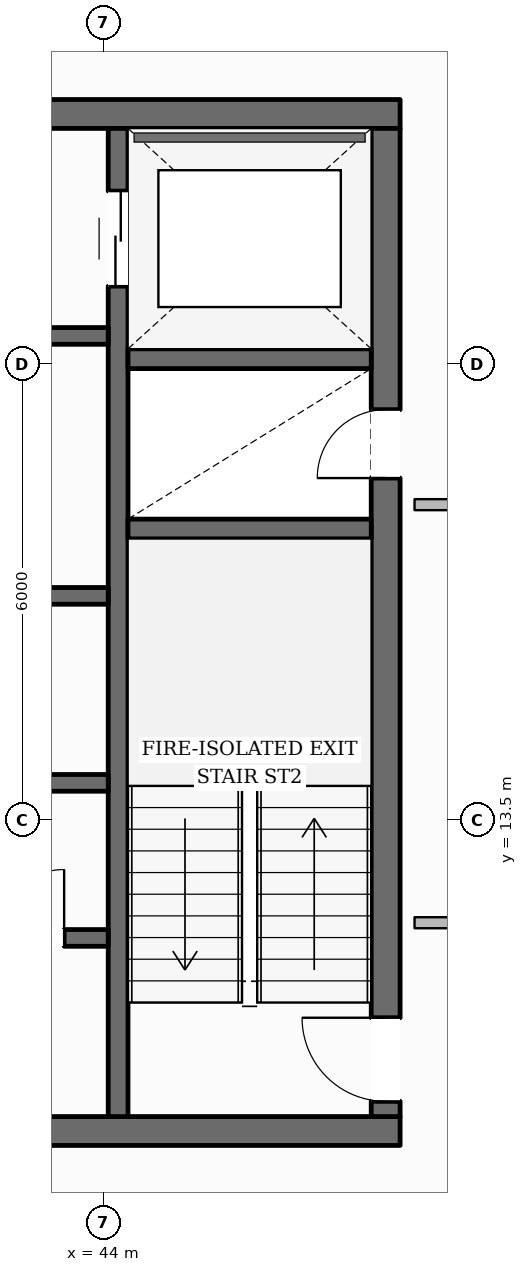
"""IFC4 building model, lengths in metres.
Left out: names, types, materials, properties, quantities, classifications, styles, units other than length and angle.
Written with IfcOpenShell. Run it as: python <this file> out.ifc"""

import sys

from ifc_helpers import new_model, si_unit, direction, frame, frame_2d, origin, place, context, subcontext, project, spatial, rectangle, extrude, element, fill, save


model = new_model("IFC4")
c1 = context("Model", 3, precision=1e-05, world=origin(), true_north=direction((0.0, 1.0)))
c2 = subcontext(c1, "Body", "Model", "MODEL_VIEW")
j1 = project(units=[si_unit("LENGTHUNIT", "METRE"), si_unit("PLANEANGLEUNIT", "RADIAN")], contexts=[c1])
p1 = place(None, origin())
s1 = spatial("IfcSite", under=j1, at=p1, CompositionType="ELEMENT")
p2 = place(p1, origin())
s2 = spatial("IfcBuilding", under=s1, at=p2, CompositionType="ELEMENT")
p3 = place(p2, frame((0.0, 0.0, 239.5)))
s3 = spatial("IfcBuildingStorey", under=s2, at=p3, CompositionType="ELEMENT", Elevation=239.5)
p4 = place(p3, frame((28.1, 9.41, 0.0), z_axis=(0.0, 0.0, 1.0), x_axis=(1.0, 0.0, 0.0)))
e1 = element("IfcWall", 1, at=p4, inside=s3, PredefinedType="SOLIDWALL", context=c2, shape_type="SweptSolid", body=[
    extrude(rectangle(XDim=19.8, YDim=0.38, at=frame_2d((9.9, 0.0))), origin(), (0.0, 0.0, 1.0), 3.61),
])
p5 = place(p4, frame((10.4, 0.0, 0.0)))
e2 = element("IfcOpeningElement", 2, at=p5, cuts=e1, PredefinedType="OPENING", context=c2, shape_type="SweptSolid", body=[
    extrude(rectangle(XDim=1.4, YDim=2.2, at=frame_2d((0.7, 1.1))), frame((0.0, 0.2, 0.0), z_axis=(0.0, -1.0, 0.0), x_axis=(1.0, 0.0, 0.0)), (0.0, 0.0, 1.0), 0.4),
])
p6 = place(p3, frame((28.1, 22.79, 0.0), z_axis=(0.0, 0.0, 1.0), x_axis=(1.0, 0.0, 0.0)))
e3 = element("IfcWall", 3, at=p6, inside=s3, PredefinedType="SOLIDWALL", context=c2, shape_type="SweptSolid", body=[
    extrude(rectangle(XDim=19.8, YDim=0.38, at=frame_2d((9.9, 0.0))), origin(), (0.0, 0.0, 1.0), 3.61),
])
p7 = place(p6, frame((6.175, 0.0, 0.0)))
e4 = element("IfcOpeningElement", 4, at=p7, cuts=e3, PredefinedType="OPENING", context=c2, shape_type="SweptSolid", body=[
    extrude(rectangle(XDim=1.05, YDim=2.15, at=frame_2d((0.525, 1.075))), frame((0.0, 0.2, 0.0), z_axis=(0.0, -1.0, 0.0), x_axis=(1.0, 0.0, 0.0)), (0.0, 0.0, 1.0), 0.4),
])
p8 = place(p6, frame((12.575, 0.0, 0.0)))
e5 = element("IfcOpeningElement", 5, at=p8, cuts=e3, PredefinedType="OPENING", context=c2, shape_type="SweptSolid", body=[
    extrude(rectangle(XDim=1.05, YDim=2.15, at=frame_2d((0.525, 1.075))), frame((0.0, 0.2, 0.0), z_axis=(0.0, -1.0, 0.0), x_axis=(1.0, 0.0, 0.0)), (0.0, 0.0, 1.0), 0.4),
])
p9 = place(p3, frame((47.71, 9.6, 0.0), z_axis=(0.0, 0.0, 1.0), x_axis=(0.0, 1.0, 0.0)))
e6 = element("IfcWall", 6, at=p9, inside=s3, PredefinedType="SOLIDWALL", context=c2, shape_type="SweptSolid", body=[
    extrude(rectangle(XDim=13.0, YDim=0.38, at=frame_2d((6.5, 0.0))), origin(), (0.0, 0.0, 1.0), 3.61),
])
p10 = place(p9, frame((0.2, 0.0, 0.0)))
e7 = element("IfcOpeningElement", 7, at=p10, cuts=e6, PredefinedType="OPENING", context=c2, shape_type="SweptSolid", body=[
    extrude(rectangle(XDim=1.1, YDim=2.15, at=frame_2d((0.55, 1.075))), frame((0.0, 0.2, 0.0), z_axis=(0.0, -1.0, 0.0), x_axis=(1.0, 0.0, 0.0)), (0.0, 0.0, 1.0), 0.4),
])
p11 = place(p9, frame((8.4, 0.0, 0.0)))
e8 = element("IfcOpeningElement", 8, at=p11, cuts=e6, PredefinedType="OPENING", context=c2, shape_type="SweptSolid", body=[
    extrude(rectangle(XDim=0.9, YDim=2.1, at=frame_2d((0.45, 1.05))), frame((0.0, 0.2, 0.0), z_axis=(0.0, -1.0, 0.0), x_axis=(1.0, 0.0, 0.0)), (0.0, 0.0, 1.0), 0.4),
])
p12 = place(p3, frame((44.19, 9.6, 0.0), z_axis=(0.0, 0.0, 1.0), x_axis=(0.0, 1.0, 0.0)))
e9 = element("IfcWall", 9, at=p12, inside=s3, PredefinedType="SHEAR", context=c2, shape_type="SweptSolid", body=[
    extrude(rectangle(XDim=13.0, YDim=0.26, at=frame_2d((6.5, 0.0))), origin(), (0.0, 0.0, 1.0), 3.61),
])
p13 = place(p12, frame((10.925, 0.0, 0.0)))
e10 = element("IfcOpeningElement", 10, at=p13, cuts=e9, PredefinedType="OPENING", context=c2, shape_type="SweptSolid", body=[
    extrude(rectangle(XDim=1.25, YDim=2.25, at=frame_2d((0.625, 1.125))), frame((0.0, 0.14, 0.0), z_axis=(0.0, -1.0, 0.0), x_axis=(1.0, 0.0, 0.0)), (0.0, 0.0, 1.0), 0.28),
])
for number, where, z_axis, x_axis in (
    (11, (44.32, 17.33, 0.0), (0.0, 0.0, 1.0), (1.0, 0.0, 0.0)),
    (12, (44.32, 19.57, 0.0), (0.0, 0.0, 1.0), (1.0, 0.0, 0.0)),
):
    element("IfcWall", number, at=place(p3, frame(where, z_axis=z_axis, x_axis=x_axis)), inside=s3, PredefinedType="SHEAR", context=c2, shape_type="SweptSolid", body=[
        extrude(rectangle(XDim=3.2, YDim=0.26, at=frame_2d((1.6, 0.0))), origin(), (0.0, 0.0, 1.0), 3.61),
    ])
p14 = place(p3, frame((31.94, 19.87, 0.0), z_axis=(0.0, 0.0, 1.0), x_axis=(1.0, 0.0, 0.0)))
e13 = element("IfcWall", 13, at=p14, inside=s3, PredefinedType="SOLIDWALL", context=c2, shape_type="SweptSolid", body=[
    extrude(rectangle(XDim=12.12, YDim=0.22, at=frame_2d((6.06, 0.0))), origin(), (0.0, 0.0, 1.0), 3.61),
])
p15 = place(p14, frame((6.3, 0.0, 0.0)))
e14 = element("IfcOpeningElement", 14, at=p15, cuts=e13, PredefinedType="OPENING", context=c2, shape_type="SweptSolid", body=[
    extrude(rectangle(XDim=1.1, YDim=2.15, at=frame_2d((0.55, 1.075))), frame((0.0, 0.12, 0.0), z_axis=(0.0, -1.0, 0.0), x_axis=(1.0, 0.0, 0.0)), (0.0, 0.0, 1.0), 0.24),
])
p16 = place(p14, frame((8.01, 0.0, 0.0)))
e15 = element("IfcOpeningElement", 15, at=p16, cuts=e13, PredefinedType="OPENING", context=c2, shape_type="SweptSolid", body=[
    extrude(rectangle(XDim=0.9, YDim=2.1, at=frame_2d((0.45, 1.05))), frame((0.0, 0.12, 0.0), z_axis=(0.0, -1.0, 0.0), x_axis=(1.0, 0.0, 0.0)), (0.0, 0.0, 1.0), 0.24),
])
p17 = place(p14, frame((10.21, 0.0, 0.0)))
e16 = element("IfcOpeningElement", 16, at=p17, cuts=e13, PredefinedType="OPENING", context=c2, shape_type="SweptSolid", body=[
    extrude(rectangle(XDim=0.9, YDim=2.1, at=frame_2d((0.45, 1.05))), frame((0.0, 0.12, 0.0), z_axis=(0.0, -1.0, 0.0), x_axis=(1.0, 0.0, 0.0)), (0.0, 0.0, 1.0), 0.24),
])
p18 = place(p3, frame((31.94, 16.45, 0.0), z_axis=(0.0, 0.0, 1.0), x_axis=(1.0, 0.0, 0.0)))
e17 = element("IfcWall", 17, at=p18, inside=s3, PredefinedType="SOLIDWALL", context=c2, shape_type="SweptSolid", body=[
    extrude(rectangle(XDim=12.12, YDim=0.22, at=frame_2d((6.06, 0.0))), origin(), (0.0, 0.0, 1.0), 3.61),
])
p19 = place(p3, frame((31.94, 13.99, 0.0), z_axis=(0.0, 0.0, 1.0), x_axis=(1.0, 0.0, 0.0)))
e18 = element("IfcWall", 18, at=p19, inside=s3, PredefinedType="SOLIDWALL", context=c2, shape_type="SweptSolid", body=[
    extrude(rectangle(XDim=12.12, YDim=0.22, at=frame_2d((6.06, 0.0))), origin(), (0.0, 0.0, 1.0), 3.61),
])
p20 = place(p19, frame((1.91, 0.0, 0.0)))
e19 = element("IfcOpeningElement", 19, at=p20, cuts=e18, PredefinedType="OPENING", context=c2, shape_type="SweptSolid", body=[
    extrude(rectangle(XDim=0.9, YDim=2.1, at=frame_2d((0.45, 1.05))), frame((0.0, 0.12, 0.0), z_axis=(0.0, -1.0, 0.0), x_axis=(1.0, 0.0, 0.0)), (0.0, 0.0, 1.0), 0.24),
])
p21 = place(p19, frame((7.95, 0.0, 0.0)))
e20 = element("IfcOpeningElement", 20, at=p21, cuts=e18, PredefinedType="OPENING", context=c2, shape_type="SweptSolid", body=[
    extrude(rectangle(XDim=1.02, YDim=2.15, at=frame_2d((0.51, 1.075))), frame((0.0, 0.12, 0.0), z_axis=(0.0, -1.0, 0.0), x_axis=(1.0, 0.0, 0.0)), (0.0, 0.0, 1.0), 0.24),
])
p22 = place(p3, frame((40.28, 11.95, 0.0), z_axis=(0.0, 0.0, 1.0), x_axis=(1.0, 0.0, 0.0)))
e21 = element("IfcWall", 21, at=p22, inside=s3, PredefinedType="SOLIDWALL", context=c2, shape_type="SweptSolid", body=[
    extrude(rectangle(XDim=3.78, YDim=0.22, at=frame_2d((1.89, 0.0))), origin(), (0.0, 0.0, 1.0), 3.61),
])
p23 = place(p22, frame((0.47, 0.0, 0.0)))
e22 = element("IfcOpeningElement", 22, at=p23, cuts=e21, PredefinedType="OPENING", context=c2, shape_type="SweptSolid", body=[
    extrude(rectangle(XDim=0.9, YDim=2.1, at=frame_2d((0.45, 1.05))), frame((0.0, 0.12, 0.0), z_axis=(0.0, -1.0, 0.0), x_axis=(1.0, 0.0, 0.0)), (0.0, 0.0, 1.0), 0.24),
])
p24 = place(p22, frame((2.3, 0.0, 0.0)))
e23 = element("IfcOpeningElement", 23, at=p24, cuts=e21, PredefinedType="OPENING", context=c2, shape_type="SweptSolid", body=[
    extrude(rectangle(XDim=0.9, YDim=2.1, at=frame_2d((0.45, 1.05))), frame((0.0, 0.12, 0.0), z_axis=(0.0, -1.0, 0.0), x_axis=(1.0, 0.0, 0.0)), (0.0, 0.0, 1.0), 0.24),
])
p25 = place(p3, frame((41.394, 44.187, 0.0), z_axis=(0.0, 0.0, 1.0), x_axis=(0.494287620829, -0.869298422807, 0.0)))
e24 = element("IfcWall", 24, at=p25, inside=s3, PredefinedType="STANDARD", context=c2, shape_type="SweptSolid", body=[
    extrude(rectangle(XDim=37.899, YDim=0.35, at=frame_2d((18.95, 0.0))), origin(), (0.0, 0.0, 1.0), 3.196),
])
p26 = place(p25, frame((33.674, 0.0, 0.65)))
e25 = element("IfcOpeningElement", 25, at=p26, cuts=e24, PredefinedType="OPENING", context=c2, shape_type="SweptSolid", body=[
    extrude(rectangle(XDim=1.35, YDim=1.75, at=frame_2d((0.675, 0.875))), frame((0.0, 0.185, 0.0), z_axis=(0.0, -1.0, 0.0), x_axis=(1.0, 0.0, 0.0)), (0.0, 0.0, 1.0), 0.37),
])
p27 = place(p25, frame((27.515, 0.0, 0.65)))
e26 = element("IfcOpeningElement", 26, at=p27, cuts=e24, PredefinedType="OPENING", context=c2, shape_type="SweptSolid", body=[
    extrude(rectangle(XDim=1.35, YDim=1.75, at=frame_2d((0.675, 0.875))), frame((0.0, 0.185, 0.0), z_axis=(0.0, -1.0, 0.0), x_axis=(1.0, 0.0, 0.0)), (0.0, 0.0, 1.0), 0.37),
])
p28 = place(p25, frame((21.357, 0.0, 0.65)))
e27 = element("IfcOpeningElement", 27, at=p28, cuts=e24, PredefinedType="OPENING", context=c2, shape_type="SweptSolid", body=[
    extrude(rectangle(XDim=1.35, YDim=1.75, at=frame_2d((0.675, 0.875))), frame((0.0, 0.185, 0.0), z_axis=(0.0, -1.0, 0.0), x_axis=(1.0, 0.0, 0.0)), (0.0, 0.0, 1.0), 0.37),
])
p29 = place(p25, frame((9.04, 0.0, 0.65)))
e28 = element("IfcOpeningElement", 28, at=p29, cuts=e24, PredefinedType="OPENING", context=c2, shape_type="SweptSolid", body=[
    extrude(rectangle(XDim=1.35, YDim=1.75, at=frame_2d((0.675, 0.875))), frame((0.0, 0.185, 0.0), z_axis=(0.0, -1.0, 0.0), x_axis=(1.0, 0.0, 0.0)), (0.0, 0.0, 1.0), 0.37),
])
p30 = place(p25, frame((2.882, 0.0, 0.65)))
e29 = element("IfcOpeningElement", 29, at=p30, cuts=e24, PredefinedType="OPENING", context=c2, shape_type="SweptSolid", body=[
    extrude(rectangle(XDim=1.35, YDim=1.75, at=frame_2d((0.675, 0.875))), frame((0.0, 0.185, 0.0), z_axis=(0.0, -1.0, 0.0), x_axis=(1.0, 0.0, 0.0)), (0.0, 0.0, 1.0), 0.37),
])
for number, where, z_axis, x_axis in (
    (30, (49.91, 17.65, 0.0), (0.0, 0.0, 1.0), (-1.0, 0.0, 0.0)),
    (31, (48.09, 12.15, 0.0), (0.0, 0.0, 1.0), (1.0, 0.0, 0.0)),
):
    element("IfcWall", number, at=place(p3, frame(where, z_axis=z_axis, x_axis=x_axis)), inside=s3, PredefinedType="PARTITIONING", context=c2, shape_type="SweptSolid", body=[
        extrude(rectangle(XDim=1.82, YDim=0.145, at=frame_2d((0.91, 0.0))), origin(), (0.0, 0.0, 1.0), 3.61),
    ])
p31 = place(p10, origin())
e32 = element("IfcDoor", 32, at=p31, inside=s3, OperationType="SINGLE_SWING_RIGHT", PredefinedType="DOOR", context=c2, shape_type="SweptSolid", body=[
    extrude(rectangle(XDim=1.1, YDim=2.15, at=frame_2d((0.55, 1.075))), frame((0.0, 0.025, 0.0), z_axis=(0.0, -1.0, 0.0), x_axis=(1.0, 0.0, 0.0)), (0.0, 0.0, 1.0), 0.05),
])
fill(e7, e32)
p32 = place(p11, origin())
e33 = element("IfcDoor", 33, at=p32, inside=s3, OperationType="SINGLE_SWING_LEFT", PredefinedType="DOOR", context=c2, shape_type="SweptSolid", body=[
    extrude(rectangle(XDim=0.9, YDim=2.1, at=frame_2d((0.45, 1.05))), frame((0.0, 0.025, 0.0), z_axis=(0.0, -1.0, 0.0), x_axis=(1.0, 0.0, 0.0)), (0.0, 0.0, 1.0), 0.05),
])
fill(e8, e33)
p33 = place(p13, origin())
e34 = element("IfcDoor", 34, at=p33, inside=s3, OperationType="DOUBLE_DOOR_SLIDING", PredefinedType="DOOR", context=c2, shape_type="SweptSolid", body=[
    extrude(rectangle(XDim=1.25, YDim=2.25, at=frame_2d((0.625, 1.125))), frame((0.0, 0.025, 0.0), z_axis=(0.0, -1.0, 0.0), x_axis=(1.0, 0.0, 0.0)), (0.0, 0.0, 1.0), 0.05),
])
fill(e10, e34)
p34 = place(p24, origin())
e35 = element("IfcDoor", 35, at=p34, inside=s3, OperationType="SINGLE_SWING_RIGHT", PredefinedType="DOOR", context=c2, shape_type="SweptSolid", body=[
    extrude(rectangle(XDim=0.9, YDim=2.1, at=frame_2d((0.45, 1.05))), frame((0.0, 0.025, 0.0), z_axis=(0.0, -1.0, 0.0), x_axis=(1.0, 0.0, 0.0)), (0.0, 0.0, 1.0), 0.05),
])
fill(e23, e35)
save(model, sys.argv[1])
